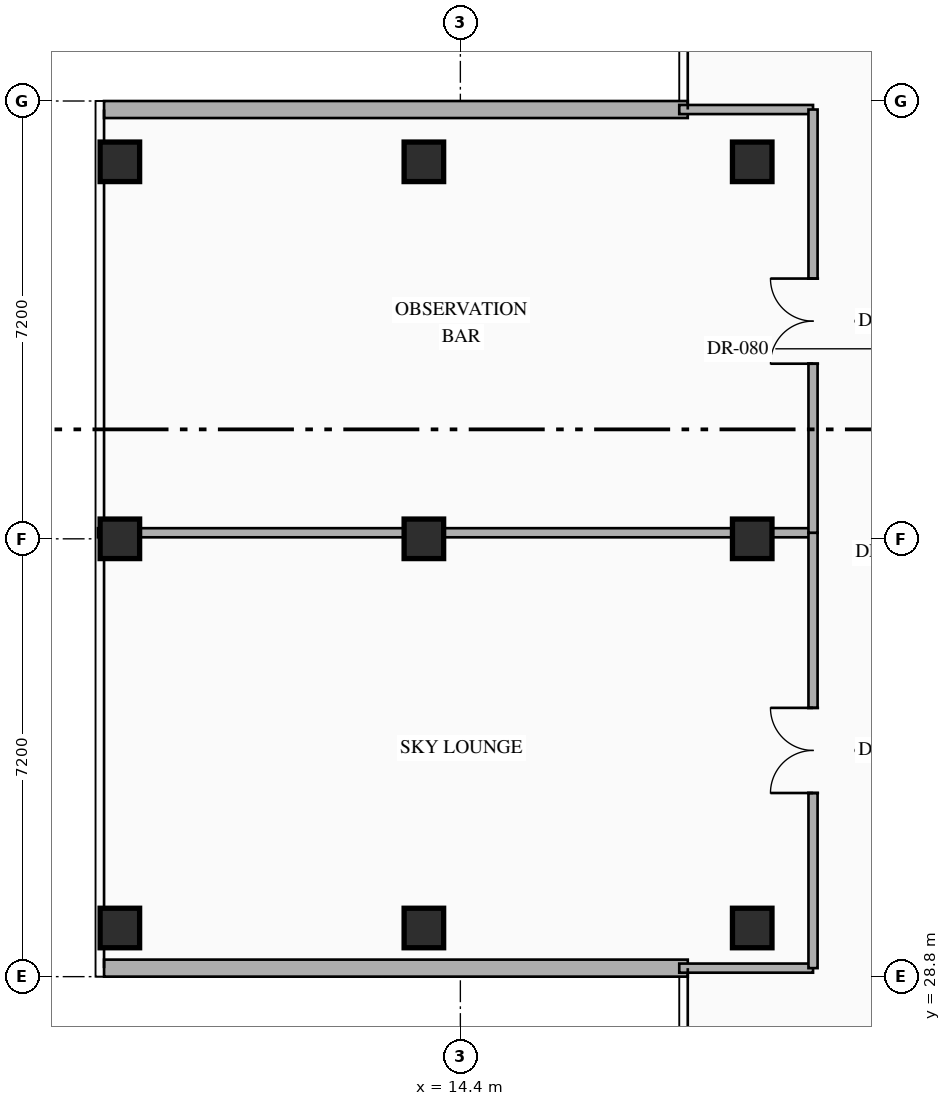
"""IFC4 building model, lengths in metres.
Left out: names, types, materials, properties, quantities, classifications, styles, units other than length and angle.
Written with IfcOpenShell. Run it as: python <this file> out.ifc"""

import sys

from ifc_helpers import new_model, si_unit, direction, frame, frame_2d, origin, origin_2d, place, context, subcontext, project, spatial, rectangle, hollow_rectangle, extrude, element, fill, save


model = new_model("IFC4")
c1 = context("Model", 3, precision=1e-05, world=origin(), true_north=direction((0.0, 1.0)))
c2 = subcontext(c1, "Body", "Model", "MODEL_VIEW")
j1 = project(units=[si_unit("LENGTHUNIT", "METRE"), si_unit("PLANEANGLEUNIT", "RADIAN")], contexts=[c1])
p1 = place(None, origin())
s1 = spatial("IfcSite", under=j1, at=p1, CompositionType="ELEMENT")
p2 = place(p1, origin())
s2 = spatial("IfcBuilding", under=s1, at=p2, CompositionType="ELEMENT")
p3 = place(p2, frame((0.0, 0.0, 257.55)))
s3 = spatial("IfcBuildingStorey", under=s2, at=p3, CompositionType="ELEMENT", Elevation=257.55)
for number, where, z_axis, x_axis in (
    (1, (19.2, 29.6, 0.0), (0.0, 0.0, 1.0), (1.0, 0.0, 0.0)),
    (2, (19.2, 42.2, 0.0), (0.0, 0.0, 1.0), (1.0, 0.0, 0.0)),
    (3, (19.2, 36.0, 0.0), (0.0, 0.0, 1.0), (1.0, 0.0, 0.0)),
):
    element("IfcColumn", number, at=place(p3, frame(where, z_axis=z_axis, x_axis=x_axis)), inside=s3, PredefinedType="COLUMN", context=c2, shape_type="SweptSolid", body=[
        extrude(hollow_rectangle(XDim=0.65, YDim=0.65, WallThickness=0.025, at=origin_2d()), origin(), (0.0, 0.0, 1.0), 4.2),
    ])
for number, where, z_axis, x_axis in (
    (4, (13.8, 29.6, 0.032), (0.0, 0.0, 1.0), (1.0, 0.0, 0.0)),
    (5, (8.8, 29.6, 0.032), (0.0, 0.0, 1.0), (1.0, 0.0, 0.0)),
    (6, (13.8, 36.0, 0.032), (0.0, 0.0, 1.0), (1.0, 0.0, 0.0)),
    (7, (8.8, 36.0, 0.032), (0.0, 0.0, 1.0), (1.0, 0.0, 0.0)),
    (8, (13.8, 42.2, 0.032), (0.0, 0.0, 1.0), (1.0, 0.0, 0.0)),
    (9, (8.8, 42.2, 0.032), (0.0, 0.0, 1.0), (1.0, 0.0, 0.0)),
):
    element("IfcColumn", number, at=place(p3, frame(where, z_axis=z_axis, x_axis=x_axis)), inside=s3, PredefinedType="COLUMN", context=c2, shape_type="SweptSolid", body=[
        extrude(hollow_rectangle(XDim=0.65, YDim=0.65, WallThickness=0.025, at=origin_2d()), origin(), (0.0, 0.0, 1.0), 4.168),
    ])
for number, where, z_axis, x_axis in (
    (10, (18.14, 28.94, 0.0), (0.0, 0.0, 1.0), (-1.0, 0.0, 0.0)),
    (11, (8.54, 43.06, 0.0), (0.0, 0.0, 1.0), (1.0, 0.0, 0.0)),
):
    element("IfcWall", number, at=place(p3, frame(where, z_axis=z_axis, x_axis=x_axis)), inside=s3, PredefinedType="STANDARD", context=c2, shape_type="SweptSolid", body=[
        extrude(rectangle(XDim=9.6, YDim=0.28, at=frame_2d((4.8, 0.0))), origin(), (0.0, 0.0, 1.0), 3.95),
    ])
for number, where, z_axis, x_axis in (
    (12, (18.0, 28.94, 0.0), (0.0, 0.0, 1.0), (1.0, 0.0, 0.0)),
    (13, (18.0, 43.06, 0.0), (0.0, 0.0, 1.0), (1.0, 0.0, 0.0)),
):
    element("IfcWall", number, at=place(p3, frame(where, z_axis=z_axis, x_axis=x_axis)), inside=s3, PredefinedType="PARTITIONING", context=c2, shape_type="SweptSolid", body=[
        extrude(rectangle(XDim=2.2, YDim=0.15, at=frame_2d((1.1, 0.0))), origin(), (0.0, 0.0, 1.0), 3.95),
    ])
p4 = place(p3, frame((8.44, 36.1, 0.0), z_axis=(0.0, 0.0, 1.0), x_axis=(1.0, 0.0, 0.0)))
e14 = element("IfcWall", 14, at=p4, inside=s3, PredefinedType="PARTITIONING", context=c2, shape_type="SweptSolid", body=[
    extrude(rectangle(XDim=11.76, YDim=0.15, at=frame_2d((5.88, 0.0))), origin(), (0.0, 0.0, 1.0), 2.445),
])
p5 = place(p3, frame((20.2, 28.94, 0.0), z_axis=(0.0, 0.0, 1.0), x_axis=(0.0, 1.0, 0.0)))
e15 = element("IfcWall", 15, at=p5, inside=s3, PredefinedType="PARTITIONING", context=c2, shape_type="SweptSolid", body=[
    extrude(rectangle(XDim=7.16, YDim=0.15, at=frame_2d((3.58, 0.0))), origin(), (0.0, 0.0, 1.0), 3.95),
])
p6 = place(p5, frame((2.88, 0.0, 0.0)))
e16 = element("IfcOpeningElement", 16, at=p6, cuts=e15, PredefinedType="OPENING", context=c2, shape_type="SweptSolid", body=[
    extrude(rectangle(XDim=1.4, YDim=2.3, at=frame_2d((0.7, 1.15))), frame((0.0, 0.085, 0.0), z_axis=(0.0, -1.0, 0.0), x_axis=(1.0, 0.0, 0.0)), (0.0, 0.0, 1.0), 0.17),
])
p7 = place(p3, frame((20.2, 36.1, 0.0), z_axis=(0.0, 0.0, 1.0), x_axis=(0.0, 1.0, 0.0)))
e17 = element("IfcWall", 17, at=p7, inside=s3, PredefinedType="PARTITIONING", context=c2, shape_type="SweptSolid", body=[
    extrude(rectangle(XDim=6.96, YDim=0.15, at=frame_2d((3.48, 0.0))), origin(), (0.0, 0.0, 1.0), 3.95),
])
p8 = place(p7, frame((2.78, 0.0, 0.0)))
e18 = element("IfcOpeningElement", 18, at=p8, cuts=e17, PredefinedType="OPENING", context=c2, shape_type="SweptSolid", body=[
    extrude(rectangle(XDim=1.4, YDim=2.3, at=frame_2d((0.7, 1.15))), frame((0.0, 0.085, 0.0), z_axis=(0.0, -1.0, 0.0), x_axis=(1.0, 0.0, 0.0)), (0.0, 0.0, 1.0), 0.17),
])
p9 = place(p6, origin())
e19 = element("IfcDoor", 19, at=p9, inside=s3, OperationType="DOUBLE_DOOR_SINGLE_SWING", PredefinedType="DOOR", context=c2, shape_type="SweptSolid", body=[
    extrude(rectangle(XDim=1.4, YDim=2.3, at=frame_2d((0.7, 1.15))), frame((0.0, 0.025, 0.0), z_axis=(0.0, -1.0, 0.0), x_axis=(1.0, 0.0, 0.0)), (0.0, 0.0, 1.0), 0.05),
])
fill(e16, e19)
p10 = place(p8, origin())
e20 = element("IfcDoor", 20, at=p10, inside=s3, OperationType="DOUBLE_DOOR_SINGLE_SWING", PredefinedType="DOOR", context=c2, shape_type="SweptSolid", body=[
    extrude(rectangle(XDim=1.4, YDim=2.3, at=frame_2d((0.7, 1.15))), frame((0.0, 0.025, 0.0), z_axis=(0.0, -1.0, 0.0), x_axis=(1.0, 0.0, 0.0)), (0.0, 0.0, 1.0), 0.05),
])
fill(e18, e20)
save(model, sys.argv[1])
